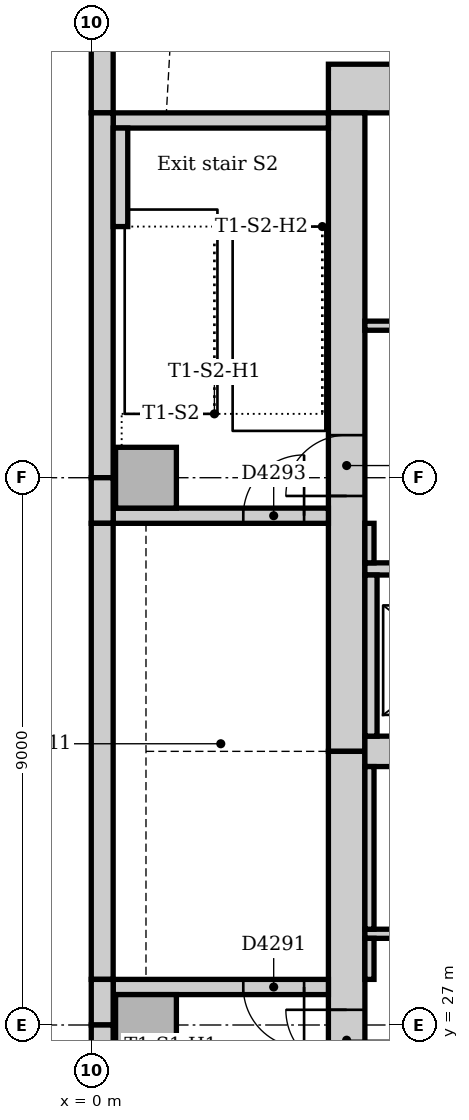
"""IFC4 building model, lengths in metres.
Left out: names, types, materials, properties, quantities, classifications, styles, units other than length and angle.
Written with IfcOpenShell. Run it as: python <this file> out.ifc"""

import sys

from ifc_helpers import new_model, si_unit, direction, frame, frame_2d, origin, origin_2d, place, context, subcontext, project, spatial, rectangle, extrude, element, fill, save


model = new_model("IFC4")
c1 = context("Model", 3, precision=1e-05, world=origin(), true_north=direction((0.0, 1.0)))
c2 = subcontext(c1, "Body", "Model", "MODEL_VIEW")
j1 = project(units=[si_unit("LENGTHUNIT", "METRE"), si_unit("PLANEANGLEUNIT", "RADIAN")], contexts=[c1])
p1 = place(None, origin())
s1 = spatial("IfcSite", under=j1, at=p1, CompositionType="ELEMENT")
p2 = place(p1, origin())
s2 = spatial("IfcBuilding", under=s1, at=p2, CompositionType="ELEMENT")
p3 = place(p2, frame((0.0, 0.0, 136.0)))
s3 = spatial("IfcBuildingStorey", under=s2, at=p3, CompositionType="ELEMENT", Elevation=136.0)
p4 = place(p3, frame((23.3, 42.4, 0.0), z_axis=(0.0, 0.0, 1.0), x_axis=(-1.0, 0.0, 0.0)))
e1 = element("IfcWall", 1, at=p4, inside=s3, PredefinedType="SOLIDWALL", context=c2, shape_type="SweptSolid", body=[
    extrude(rectangle(XDim=19.4, YDim=0.8, at=frame_2d((9.7, 0.0))), origin(), (0.0, 0.0, 1.0), 4.0),
])
p5 = place(p3, frame((4.2, 42.0, 0.0), z_axis=(0.0, 0.0, 1.0), x_axis=(0.0, -1.0, 0.0)))
e2 = element("IfcWall", 2, at=p5, inside=s3, PredefinedType="SOLIDWALL", context=c2, shape_type="SweptSolid", body=[
    extrude(rectangle(XDim=10.5, YDim=0.6, at=frame_2d((5.25, 0.0))), origin(), (0.0, 0.0, 1.0), 4.0),
])
p6 = place(p5, frame((5.3, 0.0, 0.0)))
e3 = element("IfcOpeningElement", 3, at=p6, cuts=e2, PredefinedType="OPENING", context=c2, shape_type="SweptSolid", body=[
    extrude(rectangle(XDim=1.0, YDim=2.1, at=frame_2d((0.5, 1.05))), frame((0.0, 0.31, 0.0), z_axis=(0.0, -1.0, 0.0), x_axis=(1.0, 0.0, 0.0)), (0.0, 0.0, 1.0), 0.62),
])
p7 = place(p3, frame((4.2, 31.5, 0.0), z_axis=(0.0, 0.0, 1.0), x_axis=(0.0, -1.0, 0.0)))
e4 = element("IfcWall", 4, at=p7, inside=s3, PredefinedType="SOLIDWALL", context=c2, shape_type="SweptSolid", body=[
    extrude(rectangle(XDim=10.5, YDim=0.6, at=frame_2d((5.25, 0.0))), origin(), (0.0, 0.0, 1.0), 4.0),
])
p8 = place(p7, frame((4.25, 0.0, 0.0)))
e5 = element("IfcOpeningElement", 5, at=p8, cuts=e4, PredefinedType="OPENING", context=c2, shape_type="SweptSolid", body=[
    extrude(rectangle(XDim=1.0, YDim=2.1, at=frame_2d((0.5, 1.05))), frame((0.0, 0.31, 0.0), z_axis=(0.0, -1.0, 0.0), x_axis=(1.0, 0.0, 0.0)), (0.0, 0.0, 1.0), 0.62),
])
p9 = place(p3, frame((4.5, 31.5, 0.0), z_axis=(0.0, 0.0, 1.0), x_axis=(1.0, 0.0, 0.0)))
e6 = element("IfcWall", 6, at=p9, inside=s3, PredefinedType="SOLIDWALL", context=c2, shape_type="SweptSolid", body=[
    extrude(rectangle(XDim=18.0, YDim=0.5, at=frame_2d((9.0, 0.0))), origin(), (0.0, 0.0, 1.0), 4.0),
])
p10 = place(p3, frame((3.9, 27.625, 0.0), z_axis=(0.0, 0.0, 1.0), x_axis=(-1.0, 0.0, 0.0)))
e7 = element("IfcWall", 7, at=p10, inside=s3, PredefinedType="SOLIDWALL", context=c2, shape_type="SweptSolid", body=[
    extrude(rectangle(XDim=3.54, YDim=0.25, at=frame_2d((1.77, 0.0))), origin(), (0.0, 0.0, 1.0), 4.0),
])
p11 = place(p10, frame((0.4, 0.0, 0.0)))
e8 = element("IfcOpeningElement", 8, at=p11, cuts=e7, PredefinedType="OPENING", context=c2, shape_type="SweptSolid", body=[
    extrude(rectangle(XDim=1.0, YDim=2.1, at=frame_2d((0.5, 1.05))), frame((0.0, 0.135, 0.0), z_axis=(0.0, -1.0, 0.0), x_axis=(1.0, 0.0, 0.0)), (0.0, 0.0, 1.0), 0.27),
])
p12 = place(p3, frame((0.36, 35.375, 0.0), z_axis=(0.0, 0.0, 1.0), x_axis=(1.0, 0.0, 0.0)))
e9 = element("IfcWall", 9, at=p12, inside=s3, PredefinedType="SOLIDWALL", context=c2, shape_type="SweptSolid", body=[
    extrude(rectangle(XDim=3.54, YDim=0.25, at=frame_2d((1.77, 0.0))), origin(), (0.0, 0.0, 1.0), 4.0),
])
p13 = place(p12, frame((2.14, 0.0, 0.0)))
e10 = element("IfcOpeningElement", 10, at=p13, cuts=e9, PredefinedType="OPENING", context=c2, shape_type="SweptSolid", body=[
    extrude(rectangle(XDim=1.0, YDim=2.1, at=frame_2d((0.5, 1.05))), frame((0.0, 0.135, 0.0), z_axis=(0.0, -1.0, 0.0), x_axis=(1.0, 0.0, 0.0)), (0.0, 0.0, 1.0), 0.27),
])
p14 = place(p3, frame((3.9, 41.875, 0.0), z_axis=(0.0, 0.0, 1.0), x_axis=(-1.0, 0.0, 0.0)))
e11 = element("IfcWall", 11, at=p14, inside=s3, PredefinedType="SOLIDWALL", context=c2, shape_type="SweptSolid", body=[
    extrude(rectangle(XDim=3.54, YDim=0.25, at=frame_2d((1.77, 0.0))), origin(), (0.0, 0.0, 1.0), 4.0),
])
for number, where, z_axis, x_axis in (
    (12, (0.9, 27.0, 0.0), (0.0, 0.0, 1.0), (1.0, 0.0, 0.0)),
    (13, (0.9, 36.0, 0.0), (0.0, 0.0, 1.0), (1.0, 0.0, 0.0)),
):
    element("IfcColumn", number, at=place(p3, frame(where, z_axis=z_axis, x_axis=x_axis)), inside=s3, PredefinedType="COLUMN", context=c2, shape_type="SweptSolid", body=[
        extrude(rectangle(XDim=1.0, YDim=1.0, at=origin_2d()), origin(), (0.0, 0.0, 1.0), 4.0),
    ])
p15 = place(p3, frame((0.18, 45.257, 0.0), z_axis=(0.0, 0.0, 1.0), x_axis=(0.0, -1.0, 0.0)))
e14 = element("IfcWall", 14, at=p15, inside=s3, PredefinedType="STANDARD", context=c2, shape_type="SweptSolid", body=[
    extrude(rectangle(XDim=3.257, YDim=0.36, at=frame_2d((1.629, 0.0))), origin(), (0.0, 0.0, 1.0), 3.85),
])
p16 = place(p3, frame((0.18, 42.0, 0.0), z_axis=(0.0, 0.0, 1.0), x_axis=(0.0, -1.0, 0.0)))
e15 = element("IfcWall", 15, at=p16, inside=s3, PredefinedType="STANDARD", context=c2, shape_type="SweptSolid", body=[
    extrude(rectangle(XDim=6.0, YDim=0.36, at=frame_2d((3.0, 0.0))), origin(), (0.0, 0.0, 1.0), 3.85),
])
p17 = place(p3, frame((0.18, 36.0, 0.0), z_axis=(0.0, 0.0, 1.0), x_axis=(0.0, -1.0, 0.0)))
e16 = element("IfcWall", 16, at=p17, inside=s3, PredefinedType="STANDARD", context=c2, shape_type="SweptSolid", body=[
    extrude(rectangle(XDim=0.75, YDim=0.36, at=frame_2d((0.375, 0.0))), origin(), (0.0, 0.0, 1.0), 3.436),
])
p18 = place(p3, frame((0.18, 35.25, 0.0), z_axis=(0.0, 0.0, 1.0), x_axis=(0.0, -1.0, 0.0)))
e17 = element("IfcWall", 17, at=p18, inside=s3, PredefinedType="STANDARD", context=c2, shape_type="SweptSolid", body=[
    extrude(rectangle(XDim=7.5, YDim=0.36, at=frame_2d((3.75, 0.0))), origin(), (0.0, 0.0, 1.0), 3.436),
])
p19 = place(p3, frame((0.18, 27.75, 0.0), z_axis=(0.0, 0.0, 1.0), x_axis=(0.0, -1.0, 0.0)))
e18 = element("IfcWall", 18, at=p19, inside=s3, PredefinedType="STANDARD", context=c2, shape_type="SweptSolid", body=[
    extrude(rectangle(XDim=0.75, YDim=0.36, at=frame_2d((0.375, 0.0))), origin(), (0.0, 0.0, 1.0), 3.436),
])
p20 = place(p3, frame((0.18, 27.0, 0.0), z_axis=(0.0, 0.0, 1.0), x_axis=(0.0, -1.0, 0.0)))
e19 = element("IfcWall", 19, at=p20, inside=s3, PredefinedType="STANDARD", context=c2, shape_type="SweptSolid", body=[
    extrude(rectangle(XDim=6.0, YDim=0.36, at=frame_2d((3.0, 0.0))), origin(), (0.0, 0.0, 1.0), 3.85),
])
p21 = place(p3, frame((0.48, 40.13, 0.0), z_axis=(0.0, 0.0, 1.0), x_axis=(0.0, 1.0, 0.0)))
e20 = element("IfcWall", 20, at=p21, inside=s3, PredefinedType="STANDARD", context=c2, shape_type="SweptSolid", body=[
    extrude(rectangle(XDim=1.62, YDim=0.24, at=frame_2d((0.81, 0.0))), origin(), (0.0, 0.0, 1.0), 4.0),
])
p22 = place(p3, frame((4.5, 34.5, 0.0), z_axis=(0.0, 0.0, 1.0), x_axis=(1.0, 0.0, 0.0)))
e21 = element("IfcWall", 21, at=p22, inside=s3, PredefinedType="PARTITIONING", context=c2, shape_type="SweptSolid", body=[
    extrude(rectangle(XDim=18.0, YDim=0.2, at=frame_2d((9.0, 0.0))), origin(), (0.0, 0.0, 1.0), 3.85),
])
p23 = place(p22, frame((0.95, 0.0, 0.0)))
e22 = element("IfcOpeningElement", 22, at=p23, cuts=e21, PredefinedType="OPENING", context=c2, shape_type="SweptSolid", body=[
    extrude(rectangle(XDim=1.1, YDim=2.1, at=frame_2d((0.55, 1.05))), frame((0.0, 0.11, 0.0), z_axis=(0.0, -1.0, 0.0), x_axis=(1.0, 0.0, 0.0)), (0.0, 0.0, 1.0), 0.22),
])
p24 = place(p22, frame((3.95, 0.0, 0.0)))
e23 = element("IfcOpeningElement", 23, at=p24, cuts=e21, PredefinedType="OPENING", context=c2, shape_type="SweptSolid", body=[
    extrude(rectangle(XDim=1.1, YDim=2.1, at=frame_2d((0.55, 1.05))), frame((0.0, 0.11, 0.0), z_axis=(0.0, -1.0, 0.0), x_axis=(1.0, 0.0, 0.0)), (0.0, 0.0, 1.0), 0.22),
])
p25 = place(p22, frame((12.95, 0.0, 0.0)))
e24 = element("IfcOpeningElement", 24, at=p25, cuts=e21, PredefinedType="OPENING", context=c2, shape_type="SweptSolid", body=[
    extrude(rectangle(XDim=1.1, YDim=2.1, at=frame_2d((0.55, 1.05))), frame((0.0, 0.11, 0.0), z_axis=(0.0, -1.0, 0.0), x_axis=(1.0, 0.0, 0.0)), (0.0, 0.0, 1.0), 0.22),
])
p26 = place(p22, frame((15.95, 0.0, 0.0)))
e25 = element("IfcOpeningElement", 25, at=p26, cuts=e21, PredefinedType="OPENING", context=c2, shape_type="SweptSolid", body=[
    extrude(rectangle(XDim=1.1, YDim=2.1, at=frame_2d((0.55, 1.05))), frame((0.0, 0.11, 0.0), z_axis=(0.0, -1.0, 0.0), x_axis=(1.0, 0.0, 0.0)), (0.0, 0.0, 1.0), 0.22),
])
p27 = place(p3, frame((4.6, 31.75, 0.0), z_axis=(0.0, 0.0, 1.0), x_axis=(0.0, 1.0, 0.0)))
e26 = element("IfcWall", 26, at=p27, inside=s3, PredefinedType="PARTITIONING", context=c2, shape_type="SweptSolid", body=[
    extrude(rectangle(XDim=2.65, YDim=0.2, at=frame_2d((1.325, 0.0))), origin(), (0.0, 0.0, 1.0), 3.85),
])
p28 = place(p3, frame((4.5, 28.5, 0.0), z_axis=(0.0, 0.0, 1.0), x_axis=(1.0, 0.0, 0.0)))
e27 = element("IfcWall", 27, at=p28, inside=s3, PredefinedType="PARTITIONING", context=c2, shape_type="SweptSolid", body=[
    extrude(rectangle(XDim=18.0, YDim=0.15, at=frame_2d((9.0, 0.0))), origin(), (0.0, 0.0, 1.0), 3.85),
])
p29 = place(p28, frame((2.6, 0.0, 0.0)))
e28 = element("IfcOpeningElement", 28, at=p29, cuts=e27, PredefinedType="OPENING", context=c2, shape_type="SweptSolid", body=[
    extrude(rectangle(XDim=0.9, YDim=2.1, at=frame_2d((0.45, 1.05))), frame((0.0, 0.085, 0.0), z_axis=(0.0, -1.0, 0.0), x_axis=(1.0, 0.0, 0.0)), (0.0, 0.0, 1.0), 0.17),
])
p30 = place(p28, frame((8.55, 0.0, 0.0)))
e29 = element("IfcOpeningElement", 29, at=p30, cuts=e27, PredefinedType="OPENING", context=c2, shape_type="SweptSolid", body=[
    extrude(rectangle(XDim=0.9, YDim=2.1, at=frame_2d((0.45, 1.05))), frame((0.0, 0.085, 0.0), z_axis=(0.0, -1.0, 0.0), x_axis=(1.0, 0.0, 0.0)), (0.0, 0.0, 1.0), 0.17),
])
p31 = place(p28, frame((14.45, 0.0, 0.0)))
e30 = element("IfcOpeningElement", 30, at=p31, cuts=e27, PredefinedType="OPENING", context=c2, shape_type="SweptSolid", body=[
    extrude(rectangle(XDim=0.9, YDim=2.1, at=frame_2d((0.45, 1.05))), frame((0.0, 0.085, 0.0), z_axis=(0.0, -1.0, 0.0), x_axis=(1.0, 0.0, 0.0)), (0.0, 0.0, 1.0), 0.17),
])
p32 = place(p3, frame((4.5, 38.5, 0.0), z_axis=(0.0, 0.0, 1.0), x_axis=(1.0, 0.0, 0.0)))
e31 = element("IfcWall", 31, at=p32, inside=s3, PredefinedType="PARTITIONING", context=c2, shape_type="SweptSolid", body=[
    extrude(rectangle(XDim=11.9, YDim=0.15, at=frame_2d((5.95, 0.0))), origin(), (0.0, 0.0, 1.0), 3.85),
])
p33 = place(p32, frame((1.1, 0.0, 0.0)))
e32 = element("IfcOpeningElement", 32, at=p33, cuts=e31, PredefinedType="OPENING", context=c2, shape_type="SweptSolid", body=[
    extrude(rectangle(XDim=0.9, YDim=2.1, at=frame_2d((0.45, 1.05))), frame((0.0, 0.085, 0.0), z_axis=(0.0, -1.0, 0.0), x_axis=(1.0, 0.0, 0.0)), (0.0, 0.0, 1.0), 0.17),
])
p34 = place(p32, frame((4.05, 0.0, 0.0)))
e33 = element("IfcOpeningElement", 33, at=p34, cuts=e31, PredefinedType="OPENING", context=c2, shape_type="SweptSolid", body=[
    extrude(rectangle(XDim=0.9, YDim=2.1, at=frame_2d((0.45, 1.05))), frame((0.0, 0.085, 0.0), z_axis=(0.0, -1.0, 0.0), x_axis=(1.0, 0.0, 0.0)), (0.0, 0.0, 1.0), 0.17),
])
p35 = place(p32, frame((7.05, 0.0, 0.0)))
e34 = element("IfcOpeningElement", 34, at=p35, cuts=e31, PredefinedType="OPENING", context=c2, shape_type="SweptSolid", body=[
    extrude(rectangle(XDim=0.9, YDim=2.1, at=frame_2d((0.45, 1.05))), frame((0.0, 0.085, 0.0), z_axis=(0.0, -1.0, 0.0), x_axis=(1.0, 0.0, 0.0)), (0.0, 0.0, 1.0), 0.17),
])
p36 = place(p32, frame((9.95, 0.0, 0.0)))
e35 = element("IfcOpeningElement", 35, at=p36, cuts=e31, PredefinedType="OPENING", context=c2, shape_type="SweptSolid", body=[
    extrude(rectangle(XDim=0.8, YDim=2.1, at=frame_2d((0.4, 1.05))), frame((0.0, 0.085, 0.0), z_axis=(0.0, -1.0, 0.0), x_axis=(1.0, 0.0, 0.0)), (0.0, 0.0, 1.0), 0.17),
])
p37 = place(p3, frame((4.575, 27.75, 0.0), z_axis=(0.0, 0.0, 1.0), x_axis=(0.0, 1.0, 0.0)))
e36 = element("IfcWall", 36, at=p37, inside=s3, PredefinedType="PARTITIONING", context=c2, shape_type="SweptSolid", body=[
    extrude(rectangle(XDim=0.675, YDim=0.15, at=frame_2d((0.338, 0.0))), origin(), (0.0, 0.0, 1.0), 3.85),
])
p38 = place(p3, frame((4.575, 28.575, 0.0), z_axis=(0.0, 0.0, 1.0), x_axis=(0.0, 1.0, 0.0)))
e37 = element("IfcWall", 37, at=p38, inside=s3, PredefinedType="PARTITIONING", context=c2, shape_type="SweptSolid", body=[
    extrude(rectangle(XDim=2.675, YDim=0.15, at=frame_2d((1.337, 0.0))), origin(), (0.0, 0.0, 1.0), 3.85),
])
p39 = place(p3, frame((4.575, 34.6, 0.0), z_axis=(0.0, 0.0, 1.0), x_axis=(0.0, 1.0, 0.0)))
e38 = element("IfcWall", 38, at=p39, inside=s3, PredefinedType="PARTITIONING", context=c2, shape_type="SweptSolid", body=[
    extrude(rectangle(XDim=0.65, YDim=0.15, at=frame_2d((0.325, 0.0))), origin(), (0.0, 0.0, 1.0), 3.85),
])
p40 = place(p8, frame((1.0, 0.0, 0.0), z_axis=(0.0, 0.0, 1.0), x_axis=(-1.0, 0.0, 0.0)))
e39 = element("IfcDoor", 39, at=p40, inside=s3, OperationType="SINGLE_SWING_RIGHT", PredefinedType="DOOR", context=c2, shape_type="SweptSolid", body=[
    extrude(rectangle(XDim=1.0, YDim=2.1, at=frame_2d((0.5, 1.05))), frame((0.0, 0.025, 0.0), z_axis=(0.0, -1.0, 0.0), x_axis=(1.0, 0.0, 0.0)), (0.0, 0.0, 1.0), 0.05),
])
fill(e5, e39)
p41 = place(p11, origin())
e40 = element("IfcDoor", 40, at=p41, inside=s3, OperationType="SINGLE_SWING_LEFT", PredefinedType="DOOR", context=c2, shape_type="SweptSolid", body=[
    extrude(rectangle(XDim=1.0, YDim=2.1, at=frame_2d((0.5, 1.05))), frame((0.0, 0.025, 0.0), z_axis=(0.0, -1.0, 0.0), x_axis=(1.0, 0.0, 0.0)), (0.0, 0.0, 1.0), 0.05),
])
fill(e8, e40)
p42 = place(p6, frame((1.0, 0.0, 0.0), z_axis=(0.0, 0.0, 1.0), x_axis=(-1.0, 0.0, 0.0)))
e41 = element("IfcDoor", 41, at=p42, inside=s3, OperationType="SINGLE_SWING_LEFT", PredefinedType="DOOR", context=c2, shape_type="SweptSolid", body=[
    extrude(rectangle(XDim=1.0, YDim=2.1, at=frame_2d((0.5, 1.05))), frame((0.0, 0.025, 0.0), z_axis=(0.0, -1.0, 0.0), x_axis=(1.0, 0.0, 0.0)), (0.0, 0.0, 1.0), 0.05),
])
fill(e3, e41)
p43 = place(p13, origin())
e42 = element("IfcDoor", 42, at=p43, inside=s3, OperationType="SINGLE_SWING_RIGHT", PredefinedType="DOOR", context=c2, shape_type="SweptSolid", body=[
    extrude(rectangle(XDim=1.0, YDim=2.1, at=frame_2d((0.5, 1.05))), frame((0.0, 0.025, 0.0), z_axis=(0.0, -1.0, 0.0), x_axis=(1.0, 0.0, 0.0)), (0.0, 0.0, 1.0), 0.05),
])
fill(e10, e42)
save(model, sys.argv[1])
